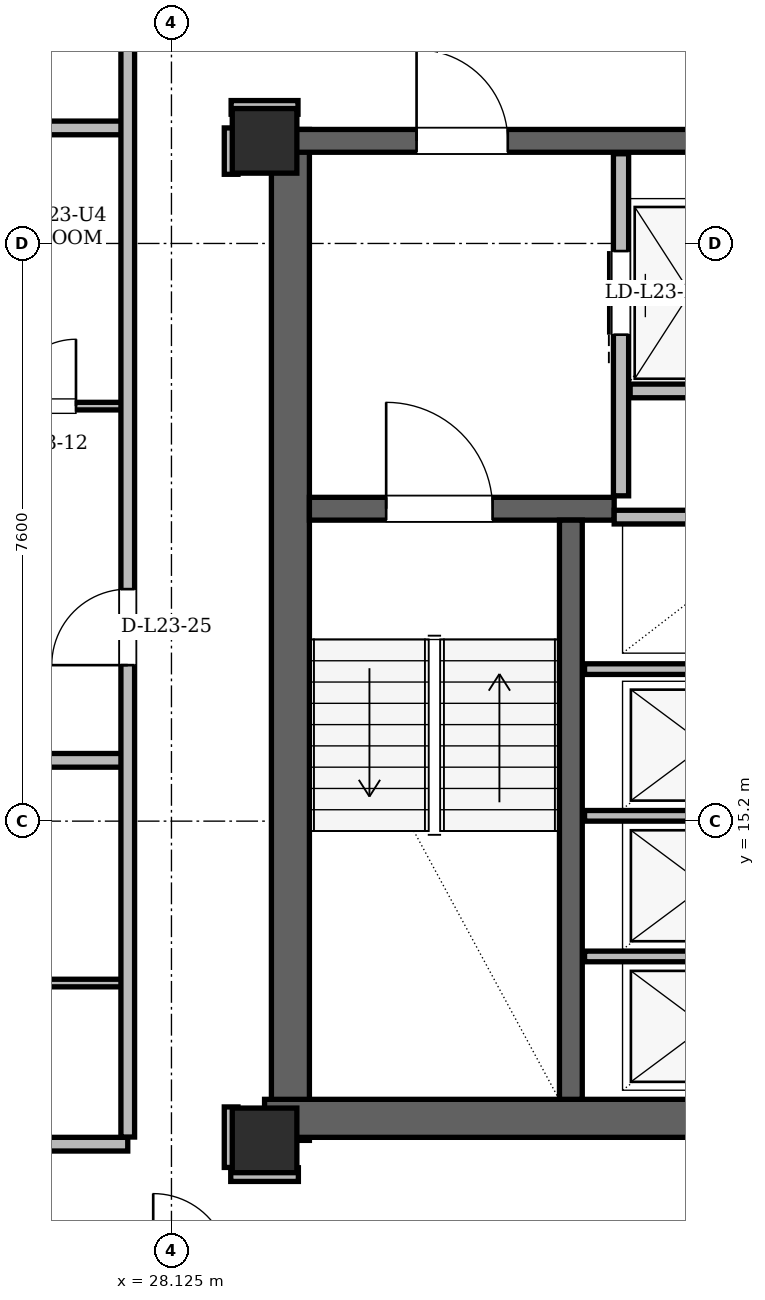
"""IFC4 building model, lengths in metres.
Left out: names, types, materials, properties, quantities, classifications, styles, units other than length and angle.
Written with IfcOpenShell. Run it as: python <this file> out.ifc"""

import sys

from ifc_helpers import new_model, si_unit, direction, frame, frame_2d, origin, origin_2d, place, context, subcontext, project, spatial, rectangle, hollow_rectangle, extrude, element, fill, save


model = new_model("IFC4")
c1 = context("Model", 3, precision=1e-05, world=origin(), true_north=direction((0.0, 1.0)))
c2 = subcontext(c1, "Body", "Model", "MODEL_VIEW")
j1 = project(units=[si_unit("LENGTHUNIT", "METRE"), si_unit("PLANEANGLEUNIT", "RADIAN")], contexts=[c1])
p1 = place(None, origin())
s1 = spatial("IfcSite", under=j1, at=p1, CompositionType="ELEMENT")
p2 = place(p1, origin())
s2 = spatial("IfcBuilding", under=s1, at=p2, CompositionType="ELEMENT")
p3 = place(p2, frame((0.0, 0.0, 89.7)))
s3 = spatial("IfcBuildingStorey", under=s2, at=p3, CompositionType="ELEMENT", Elevation=89.7)
for number, where, z_axis, x_axis in (
    (1, (29.35, 11.0, 0.0), (0.0, 0.0, 1.0), (1.0, 0.0, 0.0)),
    (2, (29.35, 24.15, 0.0), (0.0, 0.0, 1.0), (1.0, 0.0, 0.0)),
):
    element("IfcColumn", number, at=place(p3, frame(where, z_axis=z_axis, x_axis=x_axis)), inside=s3, PredefinedType="COLUMN", context=c2, shape_type="SweptSolid", body=[
        extrude(hollow_rectangle(XDim=0.85, YDim=0.85, WallThickness=0.07, at=origin_2d()), origin(), (0.0, 0.0, 1.0), 3.6),
    ])
p4 = place(p3, frame((29.69, 11.0, 0.0), z_axis=(0.0, 0.0, 1.0), x_axis=(0.0, 1.0, 0.0)))
e3 = element("IfcWall", 3, at=p4, inside=s3, PredefinedType="SHEAR", context=c2, shape_type="SweptSolid", body=[
    extrude(rectangle(XDim=13.3, YDim=0.5, at=frame_2d((6.65, 0.0))), origin(), (0.0, 0.0, 1.0), 3.36),
])
p5 = place(p3, frame((29.35, 11.29, 0.0), z_axis=(0.0, 0.0, 1.0), x_axis=(1.0, 0.0, 0.0)))
e4 = element("IfcWall", 4, at=p5, inside=s3, PredefinedType="SHEAR", context=c2, shape_type="SweptSolid", body=[
    extrude(rectangle(XDim=7.1, YDim=0.5, at=frame_2d((3.55, 0.0))), origin(), (0.0, 0.0, 1.0), 3.36),
])
p6 = place(p3, frame((29.65, 24.15, 0.0), z_axis=(0.0, 0.0, 1.0), x_axis=(1.0, 0.0, 0.0)))
e5 = element("IfcWall", 5, at=p6, inside=s3, PredefinedType="SHEAR", context=c2, shape_type="SweptSolid", body=[
    extrude(rectangle(XDim=15.7, YDim=0.3, at=frame_2d((7.85, 0.0))), origin(), (0.0, 0.0, 1.0), 3.36),
])
p7 = place(p6, frame((1.7, 0.0, 0.0)))
e6 = element("IfcOpeningElement", 6, at=p7, cuts=e5, PredefinedType="OPENING", context=c2, shape_type="SweptSolid", body=[
    extrude(rectangle(XDim=1.2, YDim=2.2, at=frame_2d((0.6, 1.1))), frame((0.0, 0.15, 0.0), z_axis=(0.0, -1.0, 0.0), x_axis=(1.0, 0.0, 0.0)), (0.0, 0.0, 1.0), 0.3),
])
p8 = place(p6, frame((12.8, 0.0, 0.0)))
e7 = element("IfcOpeningElement", 7, at=p8, cuts=e5, PredefinedType="OPENING", context=c2, shape_type="SweptSolid", body=[
    extrude(rectangle(XDim=1.2, YDim=2.2, at=frame_2d((0.6, 1.1))), frame((0.0, 0.15, 0.0), z_axis=(0.0, -1.0, 0.0), x_axis=(1.0, 0.0, 0.0)), (0.0, 0.0, 1.0), 0.3),
])
p9 = place(p6, frame((6.55, 0.0, 0.0)))
e8 = element("IfcOpeningElement", 8, at=p9, cuts=e5, PredefinedType="OPENING", context=c2, shape_type="SweptSolid", body=[
    extrude(rectangle(XDim=0.9, YDim=2.05, at=frame_2d((0.45, 1.025))), frame((0.0, 0.15, 0.0), z_axis=(0.0, -1.0, 0.0), x_axis=(1.0, 0.0, 0.0)), (0.0, 0.0, 1.0), 0.3),
])
p10 = place(p6, frame((8.45, 0.0, 0.0)))
e9 = element("IfcOpeningElement", 9, at=p10, cuts=e5, PredefinedType="OPENING", context=c2, shape_type="SweptSolid", body=[
    extrude(rectangle(XDim=0.9, YDim=2.05, at=frame_2d((0.45, 1.025))), frame((0.0, 0.15, 0.0), z_axis=(0.0, -1.0, 0.0), x_axis=(1.0, 0.0, 0.0)), (0.0, 0.0, 1.0), 0.3),
])
p11 = place(p3, frame((29.94, 19.31, 0.0), z_axis=(0.0, 0.0, 1.0), x_axis=(1.0, 0.0, 0.0)))
e10 = element("IfcWall", 10, at=p11, inside=s3, PredefinedType="SHEAR", context=c2, shape_type="SweptSolid", body=[
    extrude(rectangle(XDim=4.01, YDim=0.3, at=frame_2d((2.005, 0.0))), origin(), (0.0, 0.0, 1.0), 3.36),
])
p12 = place(p11, frame((1.01, 0.0, 0.0)))
e11 = element("IfcOpeningElement", 11, at=p12, cuts=e10, PredefinedType="OPENING", context=c2, shape_type="SweptSolid", body=[
    extrude(rectangle(XDim=1.4, YDim=2.2, at=frame_2d((0.7, 1.1))), frame((0.0, 0.15, 0.0), z_axis=(0.0, -1.0, 0.0), x_axis=(1.0, 0.0, 0.0)), (0.0, 0.0, 1.0), 0.3),
])
p13 = place(p3, frame((33.38, 11.54, 0.0), z_axis=(0.0, 0.0, 1.0), x_axis=(0.0, 1.0, 0.0)))
e12 = element("IfcWall", 12, at=p13, inside=s3, PredefinedType="SHEAR", context=c2, shape_type="SweptSolid", body=[
    extrude(rectangle(XDim=7.62, YDim=0.3, at=frame_2d((3.81, 0.0))), origin(), (0.0, 0.0, 1.0), 3.36),
])
p14 = place(p3, frame((31.278, 43.481, 0.0), z_axis=(0.0, 0.0, 1.0), x_axis=(-0.500004029544, -0.866023077313, 0.0)))
e13 = element("IfcWall", 13, at=p14, inside=s3, PredefinedType="SOLIDWALL", context=c2, shape_type="SweptSolid", body=[
    extrude(rectangle(XDim=34.275, YDim=0.34, at=frame_2d((17.137, 0.0))), origin(), (0.0, 0.0, 1.0), 2.578),
])
p15 = place(p14, frame((6.369, 0.0, 0.0)))
e14 = element("IfcOpeningElement", 14, at=p15, cuts=e13, PredefinedType="OPENING", context=c2, shape_type="SweptSolid", body=[
    extrude(rectangle(XDim=1.5, YDim=2.2, at=frame_2d((0.75, 1.1))), frame((0.0, 0.17, 0.0), z_axis=(0.0, -1.0, 0.0), x_axis=(1.0, 0.0, 0.0)), (0.0, 0.0, 1.0), 0.34),
])
p16 = place(p14, frame((26.0, 0.0, 0.0)))
e15 = element("IfcOpeningElement", 15, at=p16, cuts=e13, PredefinedType="OPENING", context=c2, shape_type="SweptSolid", body=[
    extrude(rectangle(XDim=1.5, YDim=2.2, at=frame_2d((0.75, 1.1))), frame((0.0, 0.17, 0.0), z_axis=(0.0, -1.0, 0.0), x_axis=(1.0, 0.0, 0.0)), (0.0, 0.0, 1.0), 0.34),
])
p17 = place(p14, frame((32.118, 0.0, 0.85)))
e16 = element("IfcOpeningElement", 16, at=p17, cuts=e13, PredefinedType="OPENING", context=c2, shape_type="SweptSolid", body=[
    extrude(rectangle(XDim=1.2, YDim=1.48, at=frame_2d((0.6, 0.74))), frame((0.0, 0.17, 0.0), z_axis=(0.0, -1.0, 0.0), x_axis=(1.0, 0.0, 0.0)), (0.0, 0.0, 1.0), 0.34),
])
p18 = place(p14, frame((29.585, 0.0, 0.85)))
e17 = element("IfcOpeningElement", 17, at=p18, cuts=e13, PredefinedType="OPENING", context=c2, shape_type="SweptSolid", body=[
    extrude(rectangle(XDim=1.2, YDim=1.48, at=frame_2d((0.6, 0.74))), frame((0.0, 0.17, 0.0), z_axis=(0.0, -1.0, 0.0), x_axis=(1.0, 0.0, 0.0)), (0.0, 0.0, 1.0), 0.34),
])
p19 = place(p14, frame((11.097, 0.0, 0.85)))
e18 = element("IfcOpeningElement", 18, at=p19, cuts=e13, PredefinedType="OPENING", context=c2, shape_type="SweptSolid", body=[
    extrude(rectangle(XDim=2.4, YDim=1.618, at=frame_2d((1.2, 0.809))), frame((0.0, 0.17, 0.0), z_axis=(0.0, -1.0, 0.0), x_axis=(1.0, 0.0, 0.0)), (0.0, 0.0, 1.0), 0.34),
])
p20 = place(p14, frame((14.724, 0.0, 0.85)))
e19 = element("IfcOpeningElement", 19, at=p20, cuts=e13, PredefinedType="OPENING", context=c2, shape_type="SweptSolid", body=[
    extrude(rectangle(XDim=1.2, YDim=1.48, at=frame_2d((0.6, 0.74))), frame((0.0, 0.17, 0.0), z_axis=(0.0, -1.0, 0.0), x_axis=(1.0, 0.0, 0.0)), (0.0, 0.0, 1.0), 0.34),
])
p21 = place(p14, frame((17.3, 0.0, 0.85)))
e20 = element("IfcOpeningElement", 20, at=p21, cuts=e13, PredefinedType="OPENING", context=c2, shape_type="SweptSolid", body=[
    extrude(rectangle(XDim=1.2, YDim=1.48, at=frame_2d((0.6, 0.74))), frame((0.0, 0.17, 0.0), z_axis=(0.0, -1.0, 0.0), x_axis=(1.0, 0.0, 0.0)), (0.0, 0.0, 1.0), 0.34),
])
p22 = place(p14, frame((1.32, 0.0, 0.85)))
e21 = element("IfcOpeningElement", 21, at=p22, cuts=e13, PredefinedType="OPENING", context=c2, shape_type="SweptSolid", body=[
    extrude(rectangle(XDim=1.2, YDim=1.48, at=frame_2d((0.6, 0.74))), frame((0.0, 0.17, 0.0), z_axis=(0.0, -1.0, 0.0), x_axis=(1.0, 0.0, 0.0)), (0.0, 0.0, 1.0), 0.34),
])
p23 = place(p3, frame((34.04, 19.48, 0.0), z_axis=(0.0, 0.0, 1.0), x_axis=(0.0, 1.0, 0.0)))
e22 = element("IfcWall", 22, at=p23, inside=s3, PredefinedType="PARTITIONING", context=c2, shape_type="SweptSolid", body=[
    extrude(rectangle(XDim=4.5, YDim=0.2, at=frame_2d((2.25, 0.0))), origin(), (0.0, 0.0, 1.0), 2.4),
])
p24 = place(p23, frame((2.12, 0.0, 0.0)))
e23 = element("IfcOpeningElement", 23, at=p24, cuts=e22, PredefinedType="OPENING", context=c2, shape_type="SweptSolid", body=[
    extrude(rectangle(XDim=1.1, YDim=2.2, at=frame_2d((0.55, 1.1))), frame((0.0, 0.1, 0.0), z_axis=(0.0, -1.0, 0.0), x_axis=(1.0, 0.0, 0.0)), (0.0, 0.0, 1.0), 0.2),
])
p25 = place(p3, frame((34.16, 20.86, 0.0), z_axis=(0.0, 0.0, 1.0), x_axis=(1.0, 0.0, 0.0)))
e24 = element("IfcWall", 24, at=p25, inside=s3, PredefinedType="PARTITIONING", context=c2, shape_type="SweptSolid", body=[
    extrude(rectangle(XDim=1.58, YDim=0.18, at=frame_2d((0.79, 0.0))), origin(), (0.0, 0.0, 1.0), 3.36),
])
p26 = place(p3, frame((33.95, 19.2, 0.0), z_axis=(0.0, 0.0, 1.0), x_axis=(1.0, 0.0, 0.0)))
e25 = element("IfcWall", 25, at=p26, inside=s3, PredefinedType="PARTITIONING", context=c2, shape_type="SweptSolid", body=[
    extrude(rectangle(XDim=2.27, YDim=0.18, at=frame_2d((1.135, 0.0))), origin(), (0.0, 0.0, 1.0), 3.36),
])
for number, where, z_axis, x_axis in (
    (26, (33.56, 13.42, 0.0), (0.0, 0.0, 1.0), (1.0, 0.0, 0.0)),
    (27, (33.56, 15.27, 0.0), (0.0, 0.0, 1.0), (1.0, 0.0, 0.0)),
    (28, (33.56, 17.2, 0.0), (0.0, 0.0, 1.0), (1.0, 0.0, 0.0)),
):
    element("IfcWall", number, at=place(p3, frame(where, z_axis=z_axis, x_axis=x_axis)), inside=s3, PredefinedType="PARTITIONING", context=c2, shape_type="SweptSolid", body=[
        extrude(rectangle(XDim=2.66, YDim=0.14, at=frame_2d((1.33, 0.0))), origin(), (0.0, 0.0, 1.0), 3.36),
    ])
p27 = place(p3, frame((28.905, 10.55, 0.0), z_axis=(0.0, 0.0, 1.0), x_axis=(1.0, 0.0, 0.0)))
e29 = element("IfcWall", 29, at=p27, inside=s3, PredefinedType="PARTITIONING", context=c2, shape_type="SweptSolid", body=[
    extrude(rectangle(XDim=0.89, YDim=0.18, at=frame_2d((0.445, 0.0))), origin(), (0.0, 0.0, 1.0), 3.36),
])
p28 = place(p3, frame((15.986, 10.95, 0.0), z_axis=(0.0, 0.0, 1.0), x_axis=(1.0, 0.0, 0.0)))
e30 = element("IfcWall", 30, at=p28, inside=s3, PredefinedType="PARTITIONING", context=c2, shape_type="SweptSolid", body=[
    extrude(rectangle(XDim=11.564, YDim=0.18, at=frame_2d((5.782, 0.0))), origin(), (0.0, 0.0, 1.0), 3.36),
])
p29 = place(p28, frame((4.851, 0.0, 0.0)))
e31 = element("IfcOpeningElement", 31, at=p29, cuts=e30, PredefinedType="OPENING", context=c2, shape_type="SweptSolid", body=[
    extrude(rectangle(XDim=1.0, YDim=2.18, at=frame_2d((0.5, 1.09))), frame((0.0, 0.09, 0.0), z_axis=(0.0, -1.0, 0.0), x_axis=(1.0, 0.0, 0.0)), (0.0, 0.0, 1.0), 0.18),
])
p30 = place(p3, frame((24.33, 13.07, 0.0), z_axis=(0.0, 0.0, 1.0), x_axis=(1.0, 0.0, 0.0)))
e32 = element("IfcWall", 32, at=p30, inside=s3, PredefinedType="PARTITIONING", context=c2, shape_type="SweptSolid", body=[
    extrude(rectangle(XDim=3.27, YDim=0.1, at=frame_2d((1.635, 0.0))), origin(), (0.0, 0.0, 1.0), 3.36),
])
p31 = place(p3, frame((15.612, 16.0, 0.0), z_axis=(0.0, 0.0, 1.0), x_axis=(1.0, 0.0, 0.0)))
e33 = element("IfcWall", 33, at=p31, inside=s3, PredefinedType="PARTITIONING", context=c2, shape_type="SweptSolid", body=[
    extrude(rectangle(XDim=11.938, YDim=0.18, at=frame_2d((5.969, 0.0))), origin(), (0.0, 0.0, 1.0), 3.36),
])
p32 = place(p3, frame((18.303, 20.66, 0.0), z_axis=(0.0, 0.0, 1.0), x_axis=(1.0, 0.0, 0.0)))
e34 = element("IfcWall", 34, at=p32, inside=s3, PredefinedType="PARTITIONING", context=c2, shape_type="SweptSolid", body=[
    extrude(rectangle(XDim=9.297, YDim=0.1, at=frame_2d((4.649, 0.0))), origin(), (0.0, 0.0, 1.0), 3.36),
])
p33 = place(p32, frame((0.825, 0.0, 0.0)))
e35 = element("IfcOpeningElement", 35, at=p33, cuts=e34, PredefinedType="OPENING", context=c2, shape_type="SweptSolid", body=[
    extrude(rectangle(XDim=0.95, YDim=2.1, at=frame_2d((0.475, 1.05))), frame((0.0, 0.05, 0.0), z_axis=(0.0, -1.0, 0.0), x_axis=(1.0, 0.0, 0.0)), (0.0, 0.0, 1.0), 0.1),
])
p34 = place(p32, frame((3.167, 0.0, 0.0)))
e36 = element("IfcOpeningElement", 36, at=p34, cuts=e34, PredefinedType="OPENING", context=c2, shape_type="SweptSolid", body=[
    extrude(rectangle(XDim=0.95, YDim=2.1, at=frame_2d((0.475, 1.05))), frame((0.0, 0.05, 0.0), z_axis=(0.0, -1.0, 0.0), x_axis=(1.0, 0.0, 0.0)), (0.0, 0.0, 1.0), 0.1),
])
p35 = place(p32, frame((5.326, 0.0, 0.0)))
e37 = element("IfcOpeningElement", 37, at=p35, cuts=e34, PredefinedType="OPENING", context=c2, shape_type="SweptSolid", body=[
    extrude(rectangle(XDim=0.95, YDim=2.1, at=frame_2d((0.475, 1.05))), frame((0.0, 0.05, 0.0), z_axis=(0.0, -1.0, 0.0), x_axis=(1.0, 0.0, 0.0)), (0.0, 0.0, 1.0), 0.1),
])
p36 = place(p32, frame((7.686, 0.0, 0.0)))
e38 = element("IfcOpeningElement", 38, at=p36, cuts=e34, PredefinedType="OPENING", context=c2, shape_type="SweptSolid", body=[
    extrude(rectangle(XDim=0.88, YDim=2.08, at=frame_2d((0.44, 1.04))), frame((0.0, 0.05, 0.0), z_axis=(0.0, -1.0, 0.0), x_axis=(1.0, 0.0, 0.0)), (0.0, 0.0, 1.0), 0.1),
])
p37 = place(p3, frame((20.416, 24.32, 0.0), z_axis=(0.0, 0.0, 1.0), x_axis=(1.0, 0.0, 0.0)))
e39 = element("IfcWall", 39, at=p37, inside=s3, PredefinedType="PARTITIONING", context=c2, shape_type="SweptSolid", body=[
    extrude(rectangle(XDim=7.134, YDim=0.18, at=frame_2d((3.567, 0.0))), origin(), (0.0, 0.0, 1.0), 3.36),
])
p38 = place(p3, frame((28.91, 24.59, 0.0), z_axis=(0.0, 0.0, 1.0), x_axis=(1.0, 0.0, 0.0)))
e40 = element("IfcWall", 40, at=p38, inside=s3, PredefinedType="PARTITIONING", context=c2, shape_type="SweptSolid", body=[
    extrude(rectangle(XDim=0.88, YDim=0.18, at=frame_2d((0.44, 0.0))), origin(), (0.0, 0.0, 1.0), 2.814),
])
p39 = place(p3, frame((27.55, 11.044, 0.0), z_axis=(0.0, 0.0, 1.0), x_axis=(0.0, 1.0, 0.0)))
e41 = element("IfcWall", 41, at=p39, inside=s3, PredefinedType="PARTITIONING", context=c2, shape_type="SweptSolid", body=[
    extrude(rectangle(XDim=14.832, YDim=0.18, at=frame_2d((7.416, 0.0))), origin(), (0.0, 0.0, 1.0), 2.814),
])
p40 = place(p39, frame((6.208, 0.0, 0.0)))
e42 = element("IfcOpeningElement", 42, at=p40, cuts=e41, PredefinedType="OPENING", context=c2, shape_type="SweptSolid", body=[
    extrude(rectangle(XDim=1.0, YDim=2.18, at=frame_2d((0.5, 1.09))), frame((0.0, 0.09, 0.0), z_axis=(0.0, -1.0, 0.0), x_axis=(1.0, 0.0, 0.0)), (0.0, 0.0, 1.0), 0.18),
])
p41 = place(p3, frame((28.91, 10.644, 0.0), z_axis=(0.0, 0.0, 1.0), x_axis=(0.0, 1.0, 0.0)))
e43 = element("IfcWall", 43, at=p41, inside=s3, PredefinedType="PARTITIONING", context=c2, shape_type="SweptSolid", body=[
    extrude(rectangle(XDim=0.796, YDim=0.18, at=frame_2d((0.398, 0.0))), origin(), (0.0, 0.0, 1.0), 2.814),
])
p42 = place(p3, frame((28.91, 23.71, 0.0), z_axis=(0.0, 0.0, 1.0), x_axis=(0.0, 1.0, 0.0)))
e44 = element("IfcWall", 44, at=p42, inside=s3, PredefinedType="PARTITIONING", context=c2, shape_type="SweptSolid", body=[
    extrude(rectangle(XDim=0.61, YDim=0.18, at=frame_2d((0.305, 0.0))), origin(), (0.0, 0.0, 1.0), 3.36),
])
p43 = place(p24, origin())
e45 = element("IfcDoor", 45, at=p43, inside=s3, OperationType="SLIDING_TO_LEFT", PredefinedType="DOOR", context=c2, shape_type="SweptSolid", body=[
    extrude(rectangle(XDim=1.1, YDim=2.2, at=frame_2d((0.55, 1.1))), frame((0.0, 0.025, 0.0), z_axis=(0.0, -1.0, 0.0), x_axis=(1.0, 0.0, 0.0)), (0.0, 0.0, 1.0), 0.05),
])
fill(e23, e45)
p44 = place(p12, origin())
e46 = element("IfcDoor", 46, at=p44, inside=s3, OperationType="SINGLE_SWING_LEFT", PredefinedType="DOOR", context=c2, shape_type="SweptSolid", body=[
    extrude(rectangle(XDim=1.4, YDim=2.2, at=frame_2d((0.7, 1.1))), frame((0.0, 0.025, 0.0), z_axis=(0.0, -1.0, 0.0), x_axis=(1.0, 0.0, 0.0)), (0.0, 0.0, 1.0), 0.05),
])
fill(e11, e46)
p45 = place(p7, origin())
e47 = element("IfcDoor", 47, at=p45, inside=s3, OperationType="SINGLE_SWING_LEFT", PredefinedType="DOOR", context=c2, shape_type="SweptSolid", body=[
    extrude(rectangle(XDim=1.2, YDim=2.2, at=frame_2d((0.6, 1.1))), frame((0.0, 0.025, 0.0), z_axis=(0.0, -1.0, 0.0), x_axis=(1.0, 0.0, 0.0)), (0.0, 0.0, 1.0), 0.05),
])
fill(e6, e47)
p46 = place(p36, origin())
e48 = element("IfcDoor", 48, at=p46, inside=s3, OperationType="SINGLE_SWING_RIGHT", PredefinedType="DOOR", context=c2, shape_type="SweptSolid", body=[
    extrude(rectangle(XDim=0.88, YDim=2.08, at=frame_2d((0.44, 1.04))), frame((0.0, 0.025, 0.0), z_axis=(0.0, -1.0, 0.0), x_axis=(1.0, 0.0, 0.0)), (0.0, 0.0, 1.0), 0.05),
])
fill(e38, e48)
p47 = place(p40, origin())
e49 = element("IfcDoor", 49, at=p47, inside=s3, OperationType="SINGLE_SWING_LEFT", PredefinedType="DOOR", context=c2, shape_type="SweptSolid", body=[
    extrude(rectangle(XDim=1.0, YDim=2.18, at=frame_2d((0.5, 1.09))), frame((0.0, 0.025, 0.0), z_axis=(0.0, -1.0, 0.0), x_axis=(1.0, 0.0, 0.0)), (0.0, 0.0, 1.0), 0.05),
])
fill(e42, e49)
save(model, sys.argv[1])
